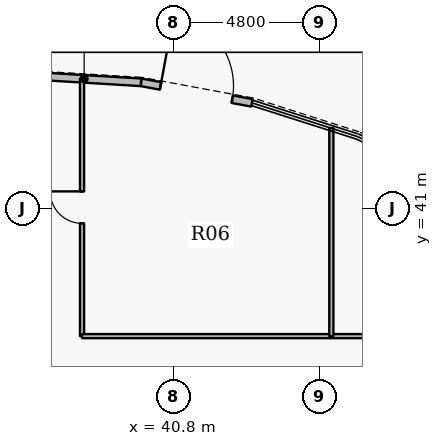
"""IFC4 building model, lengths in metres.
Left out: names, types, materials, properties, quantities, classifications, styles, units other than length and angle.
Written with IfcOpenShell. Run it as: python <this file> out.ifc"""

import sys

from ifc_helpers import new_model, si_unit, direction, frame, frame_2d, origin, origin_2d, place, context, subcontext, project, spatial, rectangle, extrude, source, transform, mapped, element, fill, save


model = new_model("IFC4")
c1 = context("Model", 3, precision=1e-05, world=origin(), true_north=direction((0.0, 1.0)))
c2 = subcontext(c1, "Body", "Model", "MODEL_VIEW")
j1 = project(units=[si_unit("LENGTHUNIT", "METRE"), si_unit("PLANEANGLEUNIT", "RADIAN")], contexts=[c1])
p1 = place(None, origin())
s1 = spatial("IfcSite", under=j1, at=p1, CompositionType="ELEMENT")
p2 = place(p1, origin())
s2 = spatial("IfcBuilding", under=s1, at=p2, CompositionType="ELEMENT")
p3 = place(p2, origin())
s3 = spatial("IfcBuildingStorey", under=s2, at=p3, CompositionType="ELEMENT", Elevation=0.0)
p4 = place(p3, frame((39.739, 45.148, 0.0), z_axis=(0.0, 0.0, 1.0), x_axis=(0.983306878602, -0.181954891374, 0.0)))
e1 = element("IfcWall", 1, at=p4, inside=s3, PredefinedType="SOLIDWALL", context=c2, shape_type="SweptSolid", body=[
    extrude(rectangle(XDim=3.709, YDim=0.25, at=frame_2d((1.854, 0.0))), origin(), (0.0, 0.0, 1.0), 5.7),
])
p5 = place(p4, frame((0.654, 0.0, 0.0)))
e2 = element("IfcOpeningElement", 2, at=p5, cuts=e1, PredefinedType="OPENING", context=c2, shape_type="SweptSolid", body=[
    extrude(rectangle(XDim=2.4, YDim=2.2, at=origin_2d()), frame((1.2, 0.135, 1.1), z_axis=(0.0, -1.0, 0.0), x_axis=(1.0, 0.0, 0.0)), (0.0, 0.0, 1.0), 0.27),
])
p6 = place(p3, frame((36.0, 45.375, 0.0), z_axis=(0.0, 0.0, 1.0), x_axis=(0.99816551411, -0.060544251933, 0.0)))
e3 = element("IfcWall", 3, at=p6, inside=s3, PredefinedType="SOLIDWALL", context=c2, shape_type="SweptSolid", body=[
    extrude(rectangle(XDim=3.746, YDim=0.25, at=frame_2d((1.873, 0.0))), origin(), (0.0, 0.0, 1.0), 4.885),
])
p7 = place(p3, frame((37.8, 36.8, 0.0), z_axis=(0.0, 0.0, 1.0), x_axis=(0.0, 1.0, 0.0)))
e4 = element("IfcWall", 4, at=p7, inside=s3, PredefinedType="PARTITIONING", context=c2, shape_type="SweptSolid", body=[
    extrude(rectangle(XDim=8.471, YDim=0.135, at=frame_2d((4.235, 0.0))), origin(), (0.0, 0.0, 1.0), 5.7),
])
p8 = place(p7, frame((3.71, 0.0, 0.0)))
e5 = element("IfcOpeningElement", 5, at=p8, cuts=e4, PredefinedType="OPENING", context=c2, shape_type="SweptSolid", body=[
    extrude(rectangle(XDim=1.05, YDim=2.15, at=origin_2d()), frame((0.525, 0.078, 1.075), z_axis=(0.0, -1.0, 0.0), x_axis=(1.0, 0.0, 0.0)), (0.0, 0.0, 1.0), 0.155),
])
p9 = place(p3, frame((37.8, 36.8, 0.0), z_axis=(0.0, 0.0, 1.0), x_axis=(1.0, 0.0, 0.0)))
e6 = element("IfcWall", 6, at=p9, inside=s3, PredefinedType="PARTITIONING", context=c2, shape_type="SweptSolid", body=[
    extrude(rectangle(XDim=11.2, YDim=0.135, at=frame_2d((5.6, 0.0))), origin(), (0.0, 0.0, 1.0), 4.885),
])
p10 = place(p3, frame((46.0, 36.8, 0.0), z_axis=(0.0, 0.0, 1.0), x_axis=(0.0, 1.0, 0.0)))
e7 = element("IfcWall", 7, at=p10, inside=s3, PredefinedType="PARTITIONING", context=c2, shape_type="SweptSolid", body=[
    extrude(rectangle(XDim=6.844, YDim=0.135, at=frame_2d((3.422, 0.0))), origin(), (0.0, 0.0, 1.0), 4.885),
])
m1 = source(origin(), c2, "Body", "SweptSolid", [
    extrude(rectangle(XDim=2.4, YDim=2.2, at=origin_2d()), frame((1.2, 0.025, 1.1), z_axis=(0.0, -1.0, 0.0), x_axis=(1.0, 0.0, 0.0)), (0.0, 0.0, 1.0), 0.05),
])
p11 = place(p5, origin())
e8 = element("IfcDoor", 8, at=p11, inside=s3, OperationType="SINGLE_SWING_LEFT", PredefinedType="GATE", context=c2, shape_type="MappedRepresentation", body=[
    mapped(m1, transform((0.0, 0.0, 0.0), x_axis=(1.0, 0.0, 0.0), y_axis=(0.0, 1.0, 0.0), z_axis=(0.0, 0.0, 1.0), scale=1.0)),
])
fill(e2, e8)
m2 = source(origin(), c2, "Body", "SweptSolid", [
    extrude(rectangle(XDim=1.05, YDim=2.15, at=origin_2d()), frame((0.525, 0.025, 1.075), z_axis=(0.0, -1.0, 0.0), x_axis=(1.0, 0.0, 0.0)), (0.0, 0.0, 1.0), 0.05),
])
p12 = place(p8, origin())
e9 = element("IfcDoor", 9, at=p12, inside=s3, OperationType="SINGLE_SWING_RIGHT", PredefinedType="DOOR", context=c2, shape_type="MappedRepresentation", body=[
    mapped(m2, transform((0.0, 0.0, 0.0), x_axis=(1.0, 0.0, 0.0), y_axis=(0.0, 1.0, 0.0), z_axis=(0.0, 0.0, 1.0), scale=1.0)),
])
fill(e5, e9)
save(model, sys.argv[1])
